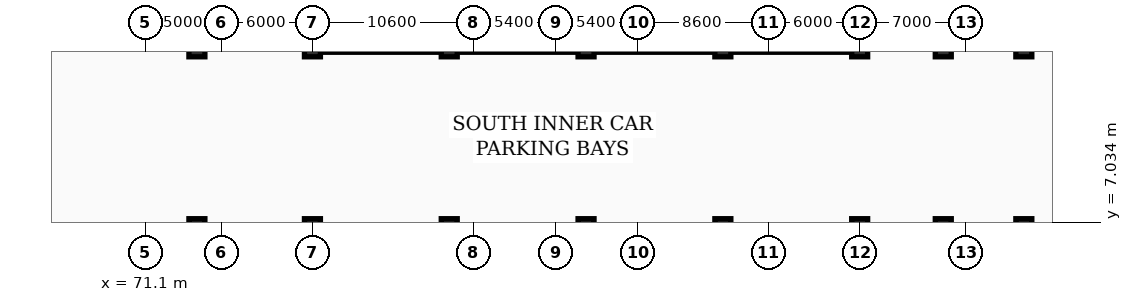
"""IFC4 building model, lengths in metres.
Left out: names, types, materials, properties, quantities, classifications, styles, units other than length and angle.
Written with IfcOpenShell. Run it as: python <this file> out.ifc"""

import sys

from ifc_helpers import new_model, si_unit, direction, frame, origin, origin_2d, place, context, subcontext, project, spatial, rectangle, extrude, element, save


model = new_model("IFC4")
c1 = context("Model", 3, precision=1e-05, world=origin(), true_north=direction((0.0, 1.0)))
c2 = subcontext(c1, "Body", "Model", "MODEL_VIEW")
j1 = project(units=[si_unit("LENGTHUNIT", "METRE"), si_unit("PLANEANGLEUNIT", "RADIAN")], contexts=[c1])
p1 = place(None, origin())
s1 = spatial("IfcSite", under=j1, at=p1, CompositionType="ELEMENT")
p2 = place(p1, origin())
s2 = spatial("IfcBuilding", under=s1, at=p2, CompositionType="ELEMENT")
p3 = place(p2, frame((0.0, 0.0, -7.2)))
s3 = spatial("IfcBuildingStorey", under=s2, at=p3, CompositionType="ELEMENT", Elevation=-7.2)
for number, where, z_axis, x_axis in (
    (1, (74.5, 6.8, 0.0), (0.0, 0.0, 1.0), (1.0, 0.0, 0.0)),
    (2, (74.5, 18.4, 0.0), (0.0, 0.0, 1.0), (1.0, 0.0, 0.0)),
    (3, (82.1, 6.8, 0.0), (0.0, 0.0, 1.0), (1.0, 0.0, 0.0)),
    (4, (82.1, 18.4, 0.0), (0.0, 0.0, 1.0), (1.0, 0.0, 0.0)),
    (5, (91.1, 6.8, 0.0), (0.0, 0.0, 1.0), (1.0, 0.0, 0.0)),
    (6, (91.1, 18.4, 0.0), (0.0, 0.0, 1.0), (1.0, 0.0, 0.0)),
    (7, (100.1, 6.8, 0.0), (0.0, 0.0, 1.0), (1.0, 0.0, 0.0)),
    (8, (100.1, 18.4, 0.0), (0.0, 0.0, 1.0), (1.0, 0.0, 0.0)),
    (9, (109.1, 6.8, 0.0), (0.0, 0.0, 1.0), (1.0, 0.0, 0.0)),
    (10, (109.1, 18.4, 0.0), (0.0, 0.0, 1.0), (1.0, 0.0, 0.0)),
    (11, (118.1, 6.8, 0.0), (0.0, 0.0, 1.0), (1.0, 0.0, 0.0)),
    (12, (118.1, 18.4, 0.0), (0.0, 0.0, 1.0), (1.0, 0.0, 0.0)),
    (13, (123.6, 6.8, 0.0), (0.0, 0.0, 1.0), (1.0, 0.0, 0.0)),
    (14, (123.6, 18.4, 0.0), (0.0, 0.0, 1.0), (1.0, 0.0, 0.0)),
    (15, (128.9, 6.8, 0.0), (0.0, 0.0, 1.0), (1.0, 0.0, 0.0)),
    (16, (128.9, 18.4, 0.0), (0.0, 0.0, 1.0), (1.0, 0.0, 0.0)),
):
    element("IfcColumn", number, at=place(p3, frame(where, z_axis=z_axis, x_axis=x_axis)), inside=s3, PredefinedType="COLUMN", context=c2, shape_type="SweptSolid", body=[
        extrude(rectangle(XDim=1.05, YDim=0.95, at=origin_2d()), origin(), (0.0, 0.0, 1.0), 3.6),
    ])
save(model, sys.argv[1])
